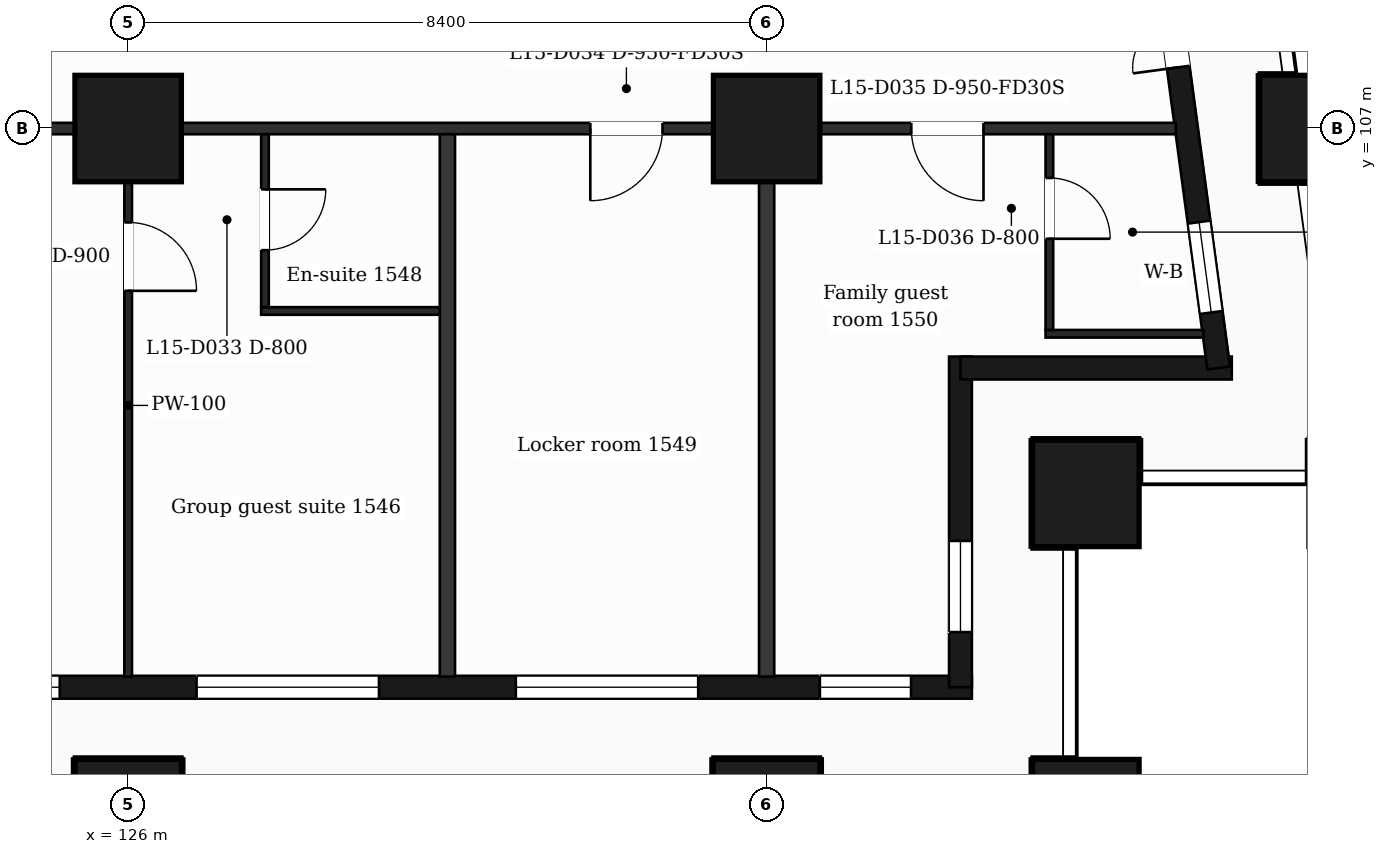
"""IFC4 building model, lengths in metres.
Left out: names, types, materials, properties, quantities, classifications, styles, units other than length and angle.
Written with IfcOpenShell. Run it as: python <this file> out.ifc"""

import sys

from ifc_helpers import new_model, si_unit, direction, frame, frame_2d, origin, origin_2d, place, context, subcontext, project, spatial, rectangle, extrude, element, fill, save


model = new_model("IFC4")
c1 = context("Model", 3, precision=1e-05, world=origin(), true_north=direction((0.0, 1.0)))
c2 = subcontext(c1, "Body", "Model", "MODEL_VIEW")
j1 = project(units=[si_unit("LENGTHUNIT", "METRE"), si_unit("PLANEANGLEUNIT", "RADIAN")], contexts=[c1])
p1 = place(None, origin())
s1 = spatial("IfcSite", under=j1, at=p1, CompositionType="ELEMENT")
p2 = place(p1, origin())
s2 = spatial("IfcBuilding", under=s1, at=p2, CompositionType="ELEMENT")
p3 = place(p2, frame((0.0, 0.0, 70.5)))
s3 = spatial("IfcBuildingStorey", under=s2, at=p3, CompositionType="ELEMENT", Elevation=70.5)
for number, where, z_axis, x_axis in (
    (1, (126.0, 98.0, 0.0), (0.0, 0.0, 1.0), (1.0, 0.0, 0.0)),
    (2, (134.4, 98.0, 0.0), (0.0, 0.0, 1.0), (1.0, 0.0, 0.0)),
    (3, (138.6, 98.0, 0.0), (0.0, 0.0, 1.0), (1.0, 0.0, 0.0)),
    (4, (138.6, 102.2, 0.0), (0.0, 0.0, 1.0), (1.0, 0.0, 0.0)),
    (5, (126.0, 107.0, 0.0), (0.0, 0.0, 1.0), (1.0, 0.0, 0.0)),
    (6, (134.4, 107.0, 0.0), (0.0, 0.0, 1.0), (1.0, 0.0, 0.0)),
    (7, (141.588, 107.0, 0.0), (0.0, 0.0, 1.0), (1.0, 0.0, 0.0)),
):
    element("IfcColumn", number, at=place(p3, frame(where, z_axis=z_axis, x_axis=x_axis)), inside=s3, PredefinedType="COLUMN", context=c2, shape_type="SweptSolid", body=[
        extrude(rectangle(XDim=1.4, YDim=1.4, at=origin_2d()), origin(), (0.0, 0.0, 1.0), 3.5),
    ])
p4 = place(p3, frame((89.85, 99.65, 0.0), z_axis=(0.0, 0.0, 1.0), x_axis=(1.0, 0.0, 0.0)))
e8 = element("IfcWall", 8, at=p4, inside=s3, PredefinedType="SOLIDWALL", context=c2, shape_type="SweptSolid", body=[
    extrude(rectangle(XDim=47.25, YDim=0.3, at=frame_2d((23.625, 0.0))), origin(), (0.0, 0.0, 1.0), 3.18),
])
p5 = place(p4, frame((0.725, 0.0, 0.9)))
e9 = element("IfcOpeningElement", 9, at=p5, cuts=e8, PredefinedType="OPENING", context=c2, shape_type="SweptSolid", body=[
    extrude(rectangle(XDim=1.2, YDim=2.1, at=frame_2d((0.6, 1.05))), frame((0.0, 0.16, 0.0), z_axis=(0.0, -1.0, 0.0), x_axis=(1.0, 0.0, 0.0)), (0.0, 0.0, 1.0), 0.32),
])
p6 = place(p4, frame((3.45, 0.0, 0.9)))
e10 = element("IfcOpeningElement", 10, at=p6, cuts=e8, PredefinedType="OPENING", context=c2, shape_type="SweptSolid", body=[
    extrude(rectangle(XDim=2.4, YDim=2.1, at=frame_2d((1.2, 1.05))), frame((0.0, 0.16, 0.0), z_axis=(0.0, -1.0, 0.0), x_axis=(1.0, 0.0, 0.0)), (0.0, 0.0, 1.0), 0.32),
])
p7 = place(p4, frame((7.35, 0.0, 0.0)))
e11 = element("IfcOpeningElement", 11, at=p7, cuts=e8, PredefinedType="OPENING", context=c2, shape_type="SweptSolid", body=[
    extrude(rectangle(XDim=1.2, YDim=2.4, at=frame_2d((0.6, 1.2))), frame((0.0, 0.16, 0.0), z_axis=(0.0, -1.0, 0.0), x_axis=(1.0, 0.0, 0.0)), (0.0, 0.0, 1.0), 0.32),
])
p8 = place(p4, frame((9.15, 0.0, 0.9)))
e12 = element("IfcOpeningElement", 12, at=p8, cuts=e8, PredefinedType="OPENING", context=c2, shape_type="SweptSolid", body=[
    extrude(rectangle(XDim=1.2, YDim=2.1, at=frame_2d((0.6, 1.05))), frame((0.0, 0.16, 0.0), z_axis=(0.0, -1.0, 0.0), x_axis=(1.0, 0.0, 0.0)), (0.0, 0.0, 1.0), 0.32),
])
p9 = place(p4, frame((11.85, 0.0, 0.9)))
e13 = element("IfcOpeningElement", 13, at=p9, cuts=e8, PredefinedType="OPENING", context=c2, shape_type="SweptSolid", body=[
    extrude(rectangle(XDim=2.4, YDim=2.1, at=frame_2d((1.2, 1.05))), frame((0.0, 0.16, 0.0), z_axis=(0.0, -1.0, 0.0), x_axis=(1.0, 0.0, 0.0)), (0.0, 0.0, 1.0), 0.32),
])
p10 = place(p4, frame((16.05, 0.0, 0.9)))
e14 = element("IfcOpeningElement", 14, at=p10, cuts=e8, PredefinedType="OPENING", context=c2, shape_type="SweptSolid", body=[
    extrude(rectangle(XDim=2.4, YDim=2.1, at=frame_2d((1.2, 1.05))), frame((0.0, 0.16, 0.0), z_axis=(0.0, -1.0, 0.0), x_axis=(1.0, 0.0, 0.0)), (0.0, 0.0, 1.0), 0.32),
])
p11 = place(p4, frame((20.85, 0.0, 0.9)))
e15 = element("IfcOpeningElement", 15, at=p11, cuts=e8, PredefinedType="OPENING", context=c2, shape_type="SweptSolid", body=[
    extrude(rectangle(XDim=1.2, YDim=2.1, at=frame_2d((0.6, 1.05))), frame((0.0, 0.16, 0.0), z_axis=(0.0, -1.0, 0.0), x_axis=(1.0, 0.0, 0.0)), (0.0, 0.0, 1.0), 0.32),
])
p12 = place(p4, frame((25.05, 0.0, 0.9)))
e16 = element("IfcOpeningElement", 16, at=p12, cuts=e8, PredefinedType="OPENING", context=c2, shape_type="SweptSolid", body=[
    extrude(rectangle(XDim=1.2, YDim=2.1, at=frame_2d((0.6, 1.05))), frame((0.0, 0.16, 0.0), z_axis=(0.0, -1.0, 0.0), x_axis=(1.0, 0.0, 0.0)), (0.0, 0.0, 1.0), 0.32),
])
p13 = place(p4, frame((28.65, 0.0, 0.9)))
e17 = element("IfcOpeningElement", 17, at=p13, cuts=e8, PredefinedType="OPENING", context=c2, shape_type="SweptSolid", body=[
    extrude(rectangle(XDim=2.4, YDim=2.1, at=frame_2d((1.2, 1.05))), frame((0.0, 0.16, 0.0), z_axis=(0.0, -1.0, 0.0), x_axis=(1.0, 0.0, 0.0)), (0.0, 0.0, 1.0), 0.32),
])
p14 = place(p4, frame((32.85, 0.0, 0.9)))
e18 = element("IfcOpeningElement", 18, at=p14, cuts=e8, PredefinedType="OPENING", context=c2, shape_type="SweptSolid", body=[
    extrude(rectangle(XDim=2.4, YDim=2.1, at=frame_2d((1.2, 1.05))), frame((0.0, 0.16, 0.0), z_axis=(0.0, -1.0, 0.0), x_axis=(1.0, 0.0, 0.0)), (0.0, 0.0, 1.0), 0.32),
])
p15 = place(p4, frame((37.05, 0.0, 0.9)))
e19 = element("IfcOpeningElement", 19, at=p15, cuts=e8, PredefinedType="OPENING", context=c2, shape_type="SweptSolid", body=[
    extrude(rectangle(XDim=2.4, YDim=2.1, at=frame_2d((1.2, 1.05))), frame((0.0, 0.16, 0.0), z_axis=(0.0, -1.0, 0.0), x_axis=(1.0, 0.0, 0.0)), (0.0, 0.0, 1.0), 0.32),
])
p16 = place(p4, frame((41.25, 0.0, 0.9)))
e20 = element("IfcOpeningElement", 20, at=p16, cuts=e8, PredefinedType="OPENING", context=c2, shape_type="SweptSolid", body=[
    extrude(rectangle(XDim=2.4, YDim=2.1, at=frame_2d((1.2, 1.05))), frame((0.0, 0.16, 0.0), z_axis=(0.0, -1.0, 0.0), x_axis=(1.0, 0.0, 0.0)), (0.0, 0.0, 1.0), 0.32),
])
p17 = place(p4, frame((45.25, 0.0, 0.9)))
e21 = element("IfcOpeningElement", 21, at=p17, cuts=e8, PredefinedType="OPENING", context=c2, shape_type="SweptSolid", body=[
    extrude(rectangle(XDim=1.2, YDim=2.1, at=frame_2d((0.6, 1.05))), frame((0.0, 0.16, 0.0), z_axis=(0.0, -1.0, 0.0), x_axis=(1.0, 0.0, 0.0)), (0.0, 0.0, 1.0), 0.32),
])
p18 = place(p3, frame((136.95, 99.65, 0.0), z_axis=(0.0, 0.0, 1.0), x_axis=(0.0, 1.0, 0.0)))
e22 = element("IfcWall", 22, at=p18, inside=s3, PredefinedType="SOLIDWALL", context=c2, shape_type="SweptSolid", body=[
    extrude(rectangle(XDim=4.35, YDim=0.3, at=frame_2d((2.175, 0.0))), origin(), (0.0, 0.0, 1.0), 3.18),
])
p19 = place(p18, frame((0.725, 0.0, 0.9)))
e23 = element("IfcOpeningElement", 23, at=p19, cuts=e22, PredefinedType="OPENING", context=c2, shape_type="SweptSolid", body=[
    extrude(rectangle(XDim=1.2, YDim=2.1, at=frame_2d((0.6, 1.05))), frame((0.0, 0.16, 0.0), z_axis=(0.0, -1.0, 0.0), x_axis=(1.0, 0.0, 0.0)), (0.0, 0.0, 1.0), 0.32),
])
p20 = place(p3, frame((136.95, 103.85, 0.0), z_axis=(0.0, 0.0, 1.0), x_axis=(1.0, 0.0, 0.0)))
e24 = element("IfcWall", 24, at=p20, inside=s3, PredefinedType="SOLIDWALL", context=c2, shape_type="SweptSolid", body=[
    extrude(rectangle(XDim=3.569, YDim=0.3, at=frame_2d((1.785, 0.0))), origin(), (0.0, 0.0, 1.0), 3.18),
])
p21 = place(p3, frame((140.348, 103.85, 0.0), z_axis=(0.0, 0.0, 1.0), x_axis=(-0.133431549479, 0.991058031401, 0.0)))
e25 = element("IfcWall", 25, at=p21, inside=s3, PredefinedType="SOLIDWALL", context=c2, shape_type="SweptSolid", body=[
    extrude(rectangle(XDim=6.609, YDim=0.3, at=frame_2d((3.304, 0.0))), origin(), (0.0, 0.0, 1.0), 3.18),
])
p22 = place(p21, frame((0.737, 0.0, 0.9)))
e26 = element("IfcOpeningElement", 26, at=p22, cuts=e25, PredefinedType="OPENING", context=c2, shape_type="SweptSolid", body=[
    extrude(rectangle(XDim=1.2, YDim=2.1, at=frame_2d((0.6, 1.05))), frame((0.0, 0.16, 0.0), z_axis=(0.0, -1.0, 0.0), x_axis=(1.0, 0.0, 0.0)), (0.0, 0.0, 1.0), 0.32),
])
p23 = place(p21, frame((3.991, 0.0, 0.0)))
e27 = element("IfcOpeningElement", 27, at=p23, cuts=e25, PredefinedType="OPENING", context=c2, shape_type="SweptSolid", body=[
    extrude(rectangle(XDim=1.2, YDim=2.4, at=frame_2d((0.6, 1.2))), frame((0.0, 0.16, 0.0), z_axis=(0.0, -1.0, 0.0), x_axis=(1.0, 0.0, 0.0)), (0.0, 0.0, 1.0), 0.32),
])
p24 = place(p3, frame((138.07, 104.3, 0.0), z_axis=(0.0, 0.0, 1.0), x_axis=(1.0, 0.0, 0.0)))
e28 = element("IfcWall", 28, at=p24, inside=s3, PredefinedType="PARTITIONING", context=c2, shape_type="SweptSolid", body=[
    extrude(rectangle(XDim=2.076, YDim=0.1, at=frame_2d((1.038, 0.0))), origin(), (0.0, 0.0, 1.0), 3.18),
])
p25 = place(p3, frame((127.75, 104.6, 0.0), z_axis=(0.0, 0.0, 1.0), x_axis=(1.0, 0.0, 0.0)))
e29 = element("IfcWall", 29, at=p25, inside=s3, PredefinedType="PARTITIONING", context=c2, shape_type="SweptSolid", body=[
    extrude(rectangle(XDim=2.45, YDim=0.1, at=frame_2d((1.225, 0.0))), origin(), (0.0, 0.0, 1.0), 3.18),
])
p26 = place(p3, frame((87.018, 107.0, 0.0), z_axis=(0.0, 0.0, 1.0), x_axis=(1.0, 0.0, 0.0)))
e30 = element("IfcWall", 30, at=p26, inside=s3, PredefinedType="PARTITIONING", context=c2, shape_type="SweptSolid", body=[
    extrude(rectangle(XDim=52.765, YDim=0.15, at=frame_2d((26.382, 0.0))), origin(), (0.0, 0.0, 1.0), 3.18),
])
p27 = place(p26, frame((0.87, 0.0, 0.0)))
e31 = element("IfcOpeningElement", 31, at=p27, cuts=e30, PredefinedType="OPENING", context=c2, shape_type="SweptSolid", body=[
    extrude(rectangle(XDim=0.95, YDim=2.1, at=frame_2d((0.475, 1.05))), frame((0.0, 0.085, 0.0), z_axis=(0.0, -1.0, 0.0), x_axis=(1.0, 0.0, 0.0)), (0.0, 0.0, 1.0), 0.17),
])
p28 = place(p26, frame((6.332, 0.0, 0.0)))
e32 = element("IfcOpeningElement", 32, at=p28, cuts=e30, PredefinedType="OPENING", context=c2, shape_type="SweptSolid", body=[
    extrude(rectangle(XDim=0.95, YDim=2.1, at=frame_2d((0.475, 1.05))), frame((0.0, 0.085, 0.0), z_axis=(0.0, -1.0, 0.0), x_axis=(1.0, 0.0, 0.0)), (0.0, 0.0, 1.0), 0.17),
])
p29 = place(p26, frame((11.882, 0.0, 0.0)))
e33 = element("IfcOpeningElement", 33, at=p29, cuts=e30, PredefinedType="OPENING", context=c2, shape_type="SweptSolid", body=[
    extrude(rectangle(XDim=0.95, YDim=2.1, at=frame_2d((0.475, 1.05))), frame((0.0, 0.085, 0.0), z_axis=(0.0, -1.0, 0.0), x_axis=(1.0, 0.0, 0.0)), (0.0, 0.0, 1.0), 0.17),
])
p30 = place(p26, frame((16.757, 0.0, 0.0)))
e34 = element("IfcOpeningElement", 34, at=p30, cuts=e30, PredefinedType="OPENING", context=c2, shape_type="SweptSolid", body=[
    extrude(rectangle(XDim=0.95, YDim=2.1, at=frame_2d((0.475, 1.05))), frame((0.0, 0.085, 0.0), z_axis=(0.0, -1.0, 0.0), x_axis=(1.0, 0.0, 0.0)), (0.0, 0.0, 1.0), 0.17),
])
p31 = place(p26, frame((20.319, 0.0, 0.0)))
e35 = element("IfcOpeningElement", 35, at=p31, cuts=e30, PredefinedType="OPENING", context=c2, shape_type="SweptSolid", body=[
    extrude(rectangle(XDim=0.95, YDim=2.1, at=frame_2d((0.475, 1.05))), frame((0.0, 0.085, 0.0), z_axis=(0.0, -1.0, 0.0), x_axis=(1.0, 0.0, 0.0)), (0.0, 0.0, 1.0), 0.17),
])
p32 = place(p26, frame((23.132, 0.0, 0.0)))
e36 = element("IfcOpeningElement", 36, at=p32, cuts=e30, PredefinedType="OPENING", context=c2, shape_type="SweptSolid", body=[
    extrude(rectangle(XDim=0.95, YDim=2.1, at=frame_2d((0.475, 1.05))), frame((0.0, 0.085, 0.0), z_axis=(0.0, -1.0, 0.0), x_axis=(1.0, 0.0, 0.0)), (0.0, 0.0, 1.0), 0.17),
])
p33 = place(p26, frame((26.657, 0.0, 0.0)))
e37 = element("IfcOpeningElement", 37, at=p33, cuts=e30, PredefinedType="OPENING", context=c2, shape_type="SweptSolid", body=[
    extrude(rectangle(XDim=0.95, YDim=2.1, at=frame_2d((0.475, 1.05))), frame((0.0, 0.085, 0.0), z_axis=(0.0, -1.0, 0.0), x_axis=(1.0, 0.0, 0.0)), (0.0, 0.0, 1.0), 0.17),
])
p34 = place(p26, frame((34.952, 0.0, 0.0)))
e38 = element("IfcOpeningElement", 38, at=p34, cuts=e30, PredefinedType="OPENING", context=c2, shape_type="SweptSolid", body=[
    extrude(rectangle(XDim=1.0, YDim=2.1, at=frame_2d((0.5, 1.05))), frame((0.0, 0.085, 0.0), z_axis=(0.0, -1.0, 0.0), x_axis=(1.0, 0.0, 0.0)), (0.0, 0.0, 1.0), 0.17),
])
p35 = place(p26, frame((45.062, 0.0, 0.0)))
e39 = element("IfcOpeningElement", 39, at=p35, cuts=e30, PredefinedType="OPENING", context=c2, shape_type="SweptSolid", body=[
    extrude(rectangle(XDim=0.95, YDim=2.1, at=frame_2d((0.475, 1.05))), frame((0.0, 0.085, 0.0), z_axis=(0.0, -1.0, 0.0), x_axis=(1.0, 0.0, 0.0)), (0.0, 0.0, 1.0), 0.17),
])
p36 = place(p26, frame((49.285, 0.0, 0.0)))
e40 = element("IfcOpeningElement", 40, at=p36, cuts=e30, PredefinedType="OPENING", context=c2, shape_type="SweptSolid", body=[
    extrude(rectangle(XDim=0.95, YDim=2.1, at=frame_2d((0.475, 1.05))), frame((0.0, 0.085, 0.0), z_axis=(0.0, -1.0, 0.0), x_axis=(1.0, 0.0, 0.0)), (0.0, 0.0, 1.0), 0.17),
])
p37 = place(p3, frame((126.0, 99.79, 0.0), z_axis=(0.0, 0.0, 1.0), x_axis=(0.0, 1.0, 0.0)))
e41 = element("IfcWall", 41, at=p37, inside=s3, PredefinedType="PARTITIONING", context=c2, shape_type="SweptSolid", body=[
    extrude(rectangle(XDim=7.135, YDim=0.1, at=frame_2d((3.567, 0.0))), origin(), (0.0, 0.0, 1.0), 3.18),
])
p38 = place(p37, frame((5.075, 0.0, 0.0)))
e42 = element("IfcOpeningElement", 42, at=p38, cuts=e41, PredefinedType="OPENING", context=c2, shape_type="SweptSolid", body=[
    extrude(rectangle(XDim=0.9, YDim=2.1, at=frame_2d((0.45, 1.05))), frame((0.0, 0.06, 0.0), z_axis=(0.0, -1.0, 0.0), x_axis=(1.0, 0.0, 0.0)), (0.0, 0.0, 1.0), 0.12),
])
p39 = place(p3, frame((127.8, 104.65, 0.0), z_axis=(0.0, 0.0, 1.0), x_axis=(0.0, 1.0, 0.0)))
e43 = element("IfcWall", 43, at=p39, inside=s3, PredefinedType="PARTITIONING", context=c2, shape_type="SweptSolid", body=[
    extrude(rectangle(XDim=2.275, YDim=0.1, at=frame_2d((1.138, 0.0))), origin(), (0.0, 0.0, 1.0), 3.18),
])
p40 = place(p39, frame((0.75, 0.0, 0.0)))
e44 = element("IfcOpeningElement", 44, at=p40, cuts=e43, PredefinedType="OPENING", context=c2, shape_type="SweptSolid", body=[
    extrude(rectangle(XDim=0.8, YDim=2.1, at=frame_2d((0.4, 1.05))), frame((0.0, 0.06, 0.0), z_axis=(0.0, -1.0, 0.0), x_axis=(1.0, 0.0, 0.0)), (0.0, 0.0, 1.0), 0.12),
])
for number, where, z_axis, x_axis in (
    (45, (130.2, 99.79, 0.0), (0.0, 0.0, 1.0), (0.0, 1.0, 0.0)),
    (46, (134.4, 99.79, 0.0), (0.0, 0.0, 1.0), (0.0, 1.0, 0.0)),
):
    element("IfcWall", number, at=place(p3, frame(where, z_axis=z_axis, x_axis=x_axis)), inside=s3, PredefinedType="PARTITIONING", context=c2, shape_type="SweptSolid", body=[
        extrude(rectangle(XDim=7.135, YDim=0.2, at=frame_2d((3.567, 0.0))), origin(), (0.0, 0.0, 1.0), 3.18),
    ])
p41 = place(p3, frame((138.12, 104.35, 0.0), z_axis=(0.0, 0.0, 1.0), x_axis=(0.0, 1.0, 0.0)))
e47 = element("IfcWall", 47, at=p41, inside=s3, PredefinedType="PARTITIONING", context=c2, shape_type="SweptSolid", body=[
    extrude(rectangle(XDim=2.575, YDim=0.1, at=frame_2d((1.288, 0.0))), origin(), (0.0, 0.0, 1.0), 3.18),
])
p42 = place(p41, frame((1.2, 0.0, 0.0)))
e48 = element("IfcOpeningElement", 48, at=p42, cuts=e47, PredefinedType="OPENING", context=c2, shape_type="SweptSolid", body=[
    extrude(rectangle(XDim=0.8, YDim=2.1, at=frame_2d((0.4, 1.05))), frame((0.0, 0.06, 0.0), z_axis=(0.0, -1.0, 0.0), x_axis=(1.0, 0.0, 0.0)), (0.0, 0.0, 1.0), 0.12),
])
p43 = place(p14, origin())
e49 = element("IfcWindow", 49, at=p43, inside=s3, PartitioningType="SINGLE_PANEL", PredefinedType="WINDOW", context=c2, shape_type="SweptSolid", body=[
    extrude(rectangle(XDim=2.4, YDim=2.1, at=frame_2d((1.2, 1.05))), frame((0.0, 0.03, 0.0), z_axis=(0.0, -1.0, 0.0), x_axis=(1.0, 0.0, 0.0)), (0.0, 0.0, 1.0), 0.06),
])
fill(e18, e49)
p44 = place(p15, origin())
e50 = element("IfcWindow", 50, at=p44, inside=s3, PartitioningType="SINGLE_PANEL", PredefinedType="WINDOW", context=c2, shape_type="SweptSolid", body=[
    extrude(rectangle(XDim=2.4, YDim=2.1, at=frame_2d((1.2, 1.05))), frame((0.0, 0.03, 0.0), z_axis=(0.0, -1.0, 0.0), x_axis=(1.0, 0.0, 0.0)), (0.0, 0.0, 1.0), 0.06),
])
fill(e19, e50)
p45 = place(p16, origin())
e51 = element("IfcWindow", 51, at=p45, inside=s3, PartitioningType="SINGLE_PANEL", PredefinedType="WINDOW", context=c2, shape_type="SweptSolid", body=[
    extrude(rectangle(XDim=2.4, YDim=2.1, at=frame_2d((1.2, 1.05))), frame((0.0, 0.03, 0.0), z_axis=(0.0, -1.0, 0.0), x_axis=(1.0, 0.0, 0.0)), (0.0, 0.0, 1.0), 0.06),
])
fill(e20, e51)
p46 = place(p17, origin())
e52 = element("IfcWindow", 52, at=p46, inside=s3, PartitioningType="SINGLE_PANEL", PredefinedType="WINDOW", context=c2, shape_type="SweptSolid", body=[
    extrude(rectangle(XDim=1.2, YDim=2.1, at=frame_2d((0.6, 1.05))), frame((0.0, 0.03, 0.0), z_axis=(0.0, -1.0, 0.0), x_axis=(1.0, 0.0, 0.0)), (0.0, 0.0, 1.0), 0.06),
])
fill(e21, e52)
p47 = place(p19, origin())
e53 = element("IfcWindow", 53, at=p47, inside=s3, PartitioningType="SINGLE_PANEL", PredefinedType="WINDOW", context=c2, shape_type="SweptSolid", body=[
    extrude(rectangle(XDim=1.2, YDim=2.1, at=frame_2d((0.6, 1.05))), frame((0.0, 0.03, 0.0), z_axis=(0.0, -1.0, 0.0), x_axis=(1.0, 0.0, 0.0)), (0.0, 0.0, 1.0), 0.06),
])
fill(e23, e53)
p48 = place(p22, origin())
e54 = element("IfcWindow", 54, at=p48, inside=s3, PartitioningType="SINGLE_PANEL", PredefinedType="WINDOW", context=c2, shape_type="SweptSolid", body=[
    extrude(rectangle(XDim=1.2, YDim=2.1, at=frame_2d((0.6, 1.05))), frame((0.0, 0.03, 0.0), z_axis=(0.0, -1.0, 0.0), x_axis=(1.0, 0.0, 0.0)), (0.0, 0.0, 1.0), 0.06),
])
fill(e26, e54)
p49 = place(p23, origin())
e55 = element("IfcDoor", 55, at=p49, inside=s3, OperationType="DOUBLE_DOOR_SINGLE_SWING", PredefinedType="DOOR", context=c2, shape_type="SweptSolid", body=[
    extrude(rectangle(XDim=1.2, YDim=2.4, at=frame_2d((0.6, 1.2))), frame((0.0, 0.025, 0.0), z_axis=(0.0, -1.0, 0.0), x_axis=(1.0, 0.0, 0.0)), (0.0, 0.0, 1.0), 0.05),
])
fill(e27, e55)
p50 = place(p38, origin())
e56 = element("IfcDoor", 56, at=p50, inside=s3, OperationType="SINGLE_SWING_LEFT", PredefinedType="DOOR", context=c2, shape_type="SweptSolid", body=[
    extrude(rectangle(XDim=0.9, YDim=2.1, at=frame_2d((0.45, 1.05))), frame((0.0, 0.025, 0.0), z_axis=(0.0, -1.0, 0.0), x_axis=(1.0, 0.0, 0.0)), (0.0, 0.0, 1.0), 0.05),
])
fill(e42, e56)
p51 = place(p40, origin())
e57 = element("IfcDoor", 57, at=p51, inside=s3, OperationType="SINGLE_SWING_RIGHT", PredefinedType="DOOR", context=c2, shape_type="SweptSolid", body=[
    extrude(rectangle(XDim=0.8, YDim=2.1, at=frame_2d((0.4, 1.05))), frame((0.0, 0.025, 0.0), z_axis=(0.0, -1.0, 0.0), x_axis=(1.0, 0.0, 0.0)), (0.0, 0.0, 1.0), 0.05),
])
fill(e44, e57)
p52 = place(p35, origin())
e58 = element("IfcDoor", 58, at=p52, inside=s3, OperationType="SINGLE_SWING_LEFT", PredefinedType="DOOR", context=c2, shape_type="SweptSolid", body=[
    extrude(rectangle(XDim=0.95, YDim=2.1, at=frame_2d((0.475, 1.05))), frame((0.0, 0.025, 0.0), z_axis=(0.0, -1.0, 0.0), x_axis=(1.0, 0.0, 0.0)), (0.0, 0.0, 1.0), 0.05),
])
fill(e39, e58)
p53 = place(p36, origin())
e59 = element("IfcDoor", 59, at=p53, inside=s3, OperationType="SINGLE_SWING_RIGHT", PredefinedType="DOOR", context=c2, shape_type="SweptSolid", body=[
    extrude(rectangle(XDim=0.95, YDim=2.1, at=frame_2d((0.475, 1.05))), frame((0.0, 0.025, 0.0), z_axis=(0.0, -1.0, 0.0), x_axis=(1.0, 0.0, 0.0)), (0.0, 0.0, 1.0), 0.05),
])
fill(e40, e59)
p54 = place(p42, origin())
e60 = element("IfcDoor", 60, at=p54, inside=s3, OperationType="SINGLE_SWING_LEFT", PredefinedType="DOOR", context=c2, shape_type="SweptSolid", body=[
    extrude(rectangle(XDim=0.8, YDim=2.1, at=frame_2d((0.4, 1.05))), frame((0.0, 0.025, 0.0), z_axis=(0.0, -1.0, 0.0), x_axis=(1.0, 0.0, 0.0)), (0.0, 0.0, 1.0), 0.05),
])
fill(e48, e60)
save(model, sys.argv[1])
